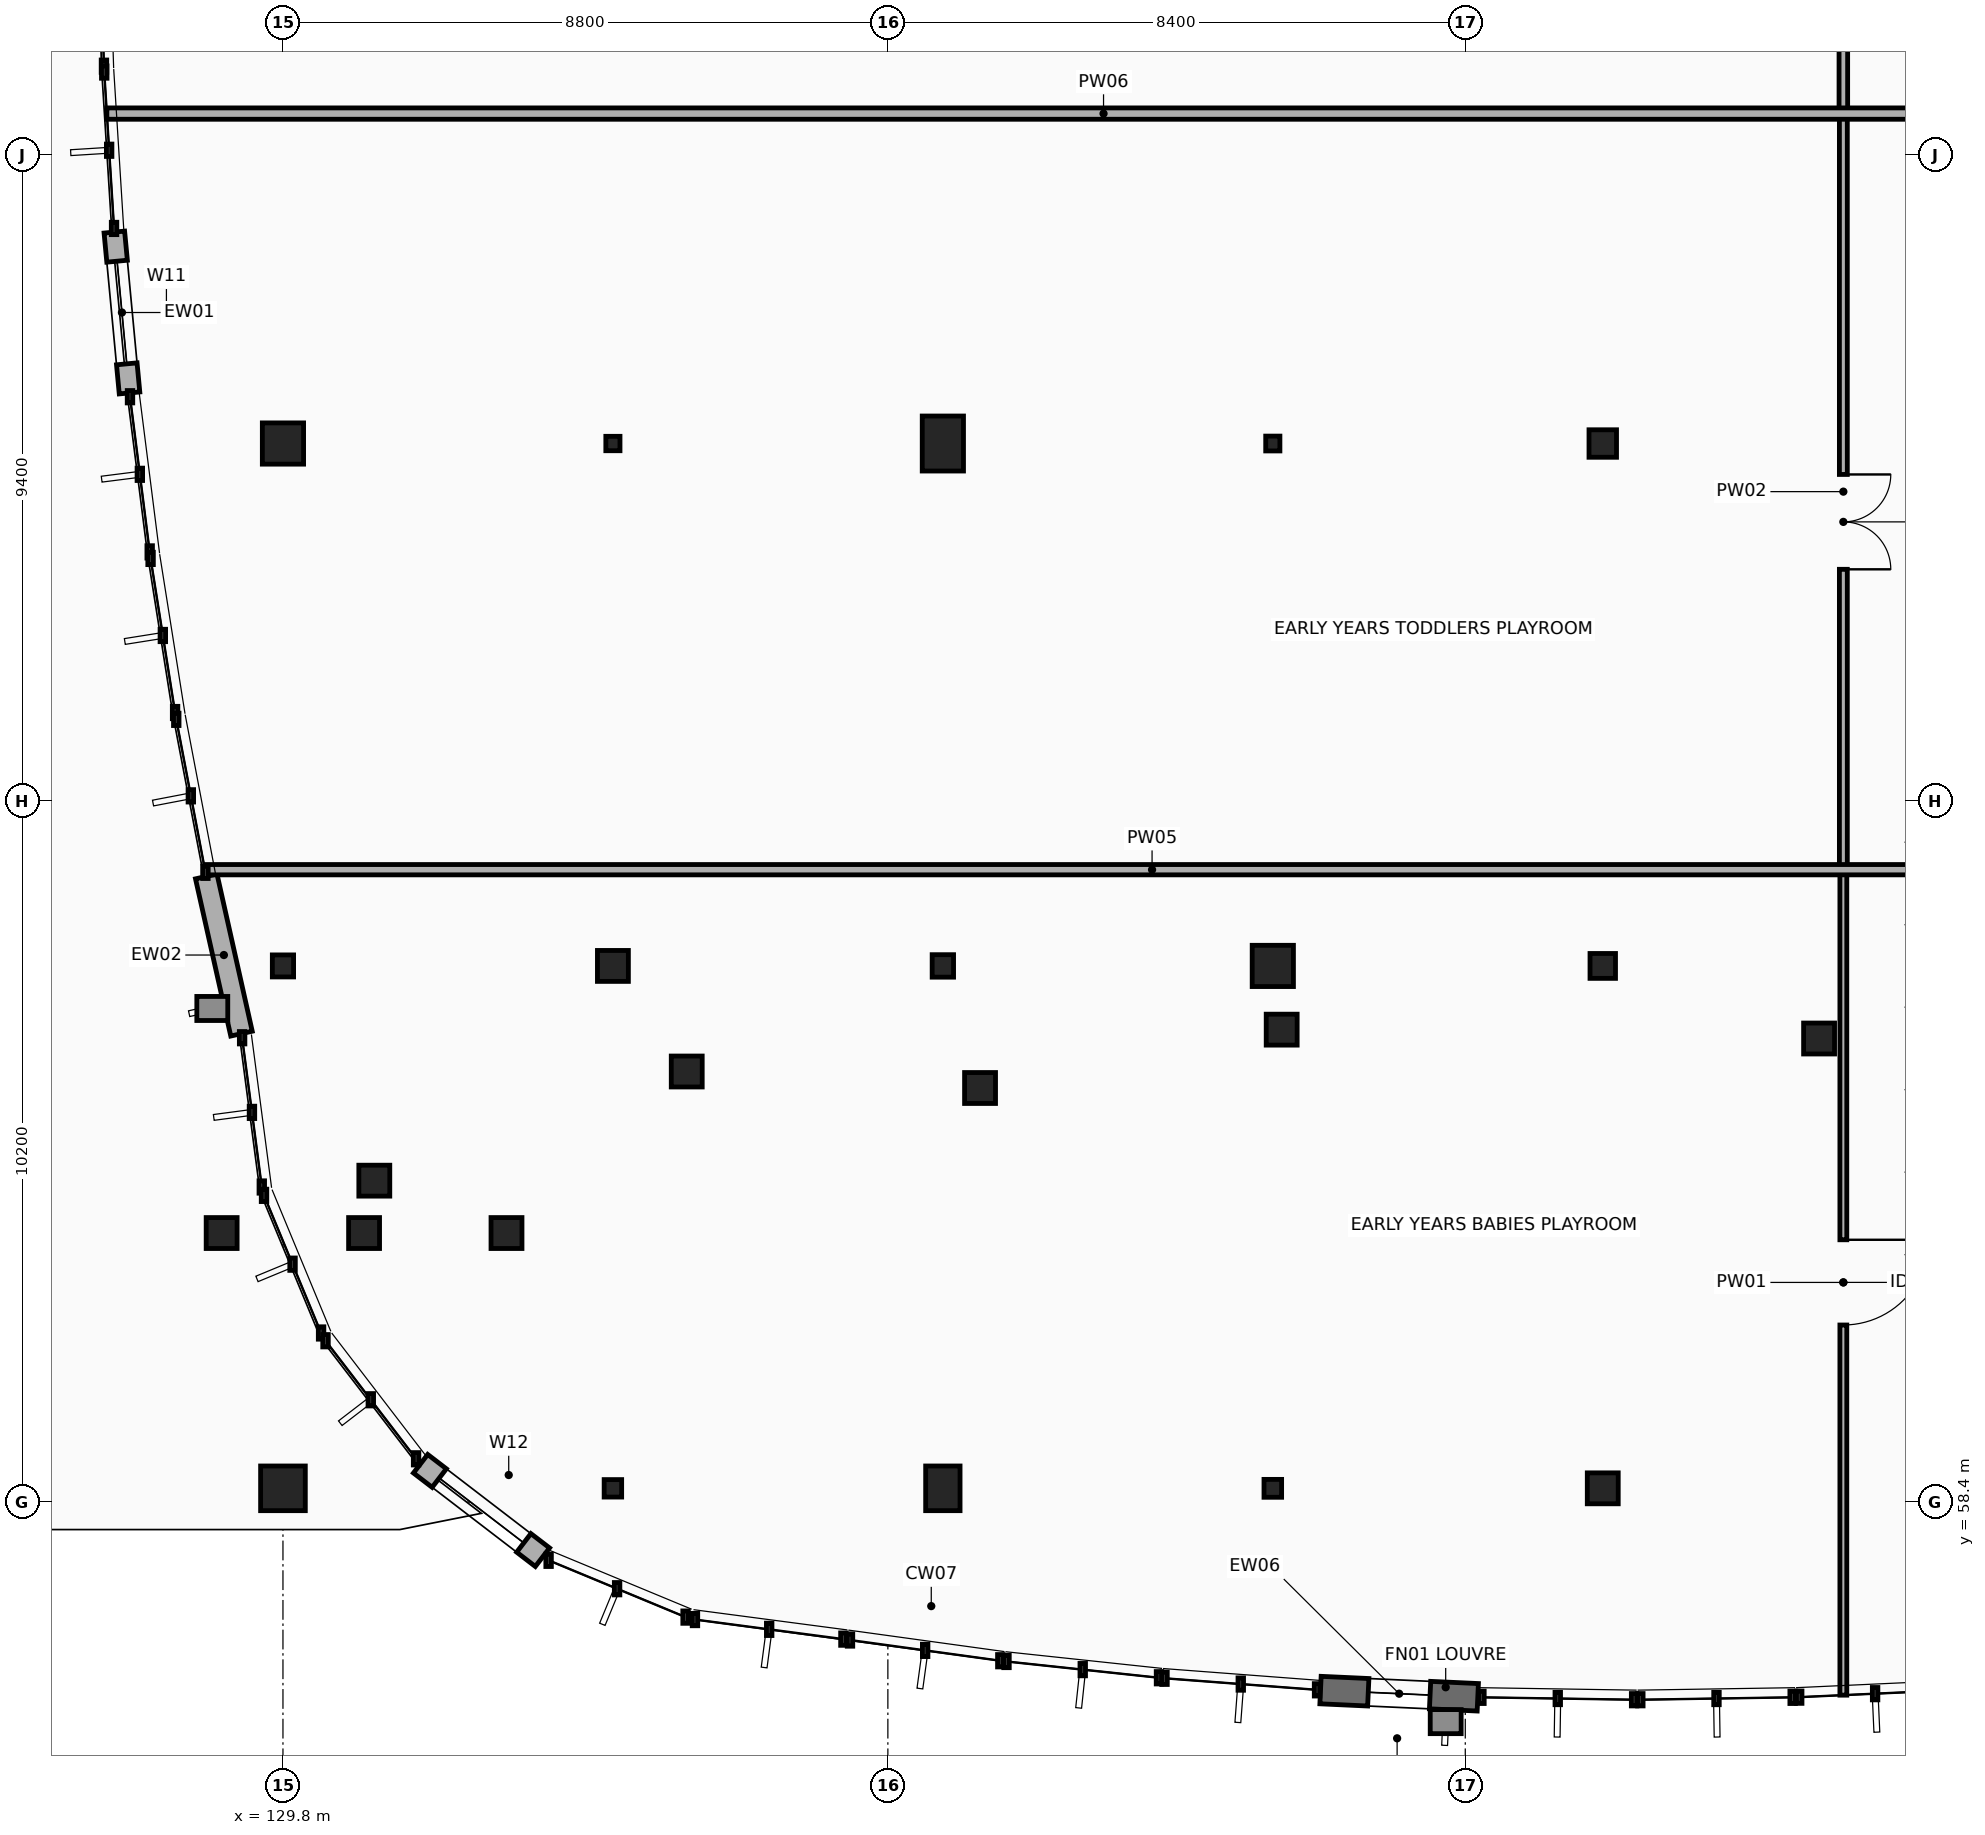
"""IFC4 building model, lengths in metres.
Left out: names, types, materials, properties, quantities, classifications, styles, units other than length and angle.
Written with IfcOpenShell. Run it as: python <this file> out.ifc"""

import sys

from ifc_helpers import new_model, si_unit, direction, frame, frame_2d, origin, origin_2d, place, context, subcontext, project, spatial, rectangle, circle, i_section, extrude, element, fill, save


model = new_model("IFC4")
c1 = context("Model", 3, precision=1e-05, world=origin(), true_north=direction((0.0, 1.0)))
c2 = subcontext(c1, "Body", "Model", "MODEL_VIEW")
j1 = project(units=[si_unit("LENGTHUNIT", "METRE"), si_unit("PLANEANGLEUNIT", "RADIAN")], contexts=[c1])
p1 = place(None, origin())
s1 = spatial("IfcSite", under=j1, at=p1, CompositionType="ELEMENT")
p2 = place(p1, origin())
s2 = spatial("IfcBuilding", under=s1, at=p2, CompositionType="ELEMENT")
p3 = place(p2, origin())
s3 = spatial("IfcBuildingStorey", under=s2, at=p3, CompositionType="ELEMENT", Elevation=0.0)
p4 = place(p3, frame((129.8, 58.6, 0.0), z_axis=(0.0, 0.0, 1.0), x_axis=(1.0, 0.0, 0.0)))
e1 = element("IfcColumn", 1, at=p4, inside=s3, PredefinedType="COLUMN", context=c2, shape_type="SweptSolid", body=[
    extrude(rectangle(XDim=0.65, YDim=0.65, at=origin_2d()), origin(), (0.0, 0.0, 1.0), 4.8),
])
p5 = place(p3, frame((129.8, 66.2, 0.0), z_axis=(0.0, 0.0, 1.0), x_axis=(1.0, 0.0, 0.0)))
e2 = element("IfcColumn", 2, at=p5, inside=s3, PredefinedType="COLUMN", context=c2, shape_type="SweptSolid", body=[
    extrude(i_section(OverallWidth=0.309, OverallDepth=0.321, WebThickness=0.014, FlangeThickness=0.022, at=origin_2d()), origin(), (0.0, 0.0, 1.0), 4.8),
])
p6 = place(p3, frame((129.8, 73.8, 0.0), z_axis=(0.0, 0.0, 1.0), x_axis=(1.0, 0.0, 0.0)))
e3 = element("IfcColumn", 3, at=p6, inside=s3, PredefinedType="COLUMN", context=c2, shape_type="SweptSolid", body=[
    extrude(rectangle(XDim=0.6, YDim=0.6, at=origin_2d()), origin(), (0.0, 0.0, 1.0), 4.8),
])
p7 = place(p3, frame((134.6, 58.6, 0.0), z_axis=(0.0, 0.0, 1.0), x_axis=(1.0, 0.0, 0.0)))
e4 = element("IfcColumn", 4, at=p7, inside=s3, PredefinedType="COLUMN", context=c2, shape_type="SweptSolid", body=[
    extrude(i_section(OverallWidth=0.255, OverallDepth=0.254, WebThickness=0.009, FlangeThickness=0.014, at=origin_2d()), origin(), (0.0, 0.0, 1.0), 4.8),
])
p8 = place(p3, frame((134.6, 66.2, 0.0), z_axis=(0.0, 0.0, 1.0), x_axis=(1.0, 0.0, 0.0)))
e5 = element("IfcColumn", 5, at=p8, inside=s3, PredefinedType="COLUMN", context=c2, shape_type="SweptSolid", body=[
    extrude(rectangle(XDim=0.45, YDim=0.45, at=origin_2d()), origin(), (0.0, 0.0, 1.0), 4.8),
])
p9 = place(p3, frame((134.6, 73.8, 0.0), z_axis=(0.0, 0.0, 1.0), x_axis=(1.0, 0.0, 0.0)))
e6 = element("IfcColumn", 6, at=p9, inside=s3, PredefinedType="COLUMN", context=c2, shape_type="SweptSolid", body=[
    extrude(i_section(OverallWidth=0.206, OverallDepth=0.21, WebThickness=0.01, FlangeThickness=0.014, at=origin_2d()), origin(), (0.0, 0.0, 1.0), 4.8),
])
p10 = place(p3, frame((139.4, 58.6, 0.0), z_axis=(0.0, 0.0, 1.0), x_axis=(1.0, 0.0, 0.0)))
e7 = element("IfcColumn", 7, at=p10, inside=s3, PredefinedType="COLUMN", context=c2, shape_type="SweptSolid", body=[
    extrude(rectangle(XDim=0.5, YDim=0.65, at=origin_2d()), origin(), (0.0, 0.0, 1.0), 4.8),
])
p11 = place(p3, frame((139.4, 66.2, 0.0), z_axis=(0.0, 0.0, 1.0), x_axis=(1.0, 0.0, 0.0)))
e8 = element("IfcColumn", 8, at=p11, inside=s3, PredefinedType="COLUMN", context=c2, shape_type="SweptSolid", body=[
    extrude(i_section(OverallWidth=0.311, OverallDepth=0.327, WebThickness=0.016, FlangeThickness=0.025, at=origin_2d()), origin(), (0.0, 0.0, 1.0), 4.8),
])
p12 = place(p3, frame((139.4, 73.8, 0.0), z_axis=(0.0, 0.0, 1.0), x_axis=(1.0, 0.0, 0.0)))
e9 = element("IfcColumn", 9, at=p12, inside=s3, PredefinedType="COLUMN", context=c2, shape_type="SweptSolid", body=[
    extrude(rectangle(XDim=0.6, YDim=0.8, at=origin_2d()), origin(), (0.0, 0.0, 1.0), 4.8),
])
p13 = place(p3, frame((144.2, 58.6, 0.0), z_axis=(0.0, 0.0, 1.0), x_axis=(1.0, 0.0, 0.0)))
e10 = element("IfcColumn", 10, at=p13, inside=s3, PredefinedType="COLUMN", context=c2, shape_type="SweptSolid", body=[
    extrude(i_section(OverallWidth=0.256, OverallDepth=0.26, WebThickness=0.01, FlangeThickness=0.017, at=origin_2d()), origin(), (0.0, 0.0, 1.0), 4.8),
])
p14 = place(p3, frame((144.2, 66.2, 0.0), z_axis=(0.0, 0.0, 1.0), x_axis=(1.0, 0.0, 0.0)))
e11 = element("IfcColumn", 11, at=p14, inside=s3, PredefinedType="COLUMN", context=c2, shape_type="SweptSolid", body=[
    extrude(rectangle(XDim=0.6, YDim=0.6, at=origin_2d()), origin(), (0.0, 0.0, 1.0), 4.8),
])
p15 = place(p3, frame((144.2, 73.8, 0.0), z_axis=(0.0, 0.0, 1.0), x_axis=(1.0, 0.0, 0.0)))
e12 = element("IfcColumn", 12, at=p15, inside=s3, PredefinedType="COLUMN", context=c2, shape_type="SweptSolid", body=[
    extrude(i_section(OverallWidth=0.206, OverallDepth=0.216, WebThickness=0.01, FlangeThickness=0.017, at=origin_2d()), origin(), (0.0, 0.0, 1.0), 4.8),
])
p16 = place(p3, frame((149.0, 58.6, 0.0), z_axis=(0.0, 0.0, 1.0), x_axis=(1.0, 0.0, 0.0)))
e13 = element("IfcColumn", 13, at=p16, inside=s3, PredefinedType="COLUMN", context=c2, shape_type="SweptSolid", body=[
    extrude(rectangle(XDim=0.45, YDim=0.45, at=origin_2d()), origin(), (0.0, 0.0, 1.0), 4.8),
])
p17 = place(p3, frame((149.0, 66.2, 0.0), z_axis=(0.0, 0.0, 1.0), x_axis=(1.0, 0.0, 0.0)))
e14 = element("IfcColumn", 14, at=p17, inside=s3, PredefinedType="COLUMN", context=c2, shape_type="SweptSolid", body=[
    extrude(i_section(OverallWidth=0.371, OverallDepth=0.362, WebThickness=0.012, FlangeThickness=0.021, at=origin_2d()), origin(), (0.0, 0.0, 1.0), 4.8),
])
p18 = place(p3, frame((149.0, 73.8, 0.0), z_axis=(0.0, 0.0, 1.0), x_axis=(1.0, 0.0, 0.0)))
e15 = element("IfcColumn", 15, at=p18, inside=s3, PredefinedType="COLUMN", context=c2, shape_type="SweptSolid", body=[
    extrude(rectangle(XDim=0.4, YDim=0.4, at=origin_2d()), origin(), (0.0, 0.0, 1.0), 4.8),
])
p19 = place(p3, frame((131.129, 63.076, 0.0), z_axis=(0.0, 0.0, 1.0), x_axis=(1.0, 0.0, 0.0)))
e16 = element("IfcColumn", 16, at=p19, inside=s3, PredefinedType="COLUMN", context=c2, shape_type="SweptSolid", body=[
    extrude(rectangle(XDim=0.45, YDim=0.45, at=origin_2d()), origin(), (0.0, 0.0, 1.0), 4.553),
])
for number, where, z_axis, x_axis in (
    (17, (135.674, 64.664, 0.0), (0.0, 0.0, 1.0), (1.0, 0.0, 0.0)),
    (18, (139.941, 64.424, 0.0), (0.0, 0.0, 1.0), (1.0, 0.0, 0.0)),
    (19, (144.329, 65.273, 0.0), (0.0, 0.0, 1.0), (1.0, 0.0, 0.0)),
    (20, (152.147, 65.144, 0.0), (0.0, 0.0, 1.0), (1.0, 0.0, 0.0)),
):
    element("IfcColumn", number, at=place(p3, frame(where, z_axis=z_axis, x_axis=x_axis)), inside=s3, PredefinedType="COLUMN", context=c2, shape_type="SweptSolid", body=[
        extrude(rectangle(XDim=0.45, YDim=0.45, at=origin_2d()), origin(), (0.0, 0.0, 1.0), 4.8),
    ])
for number, where, z_axis, x_axis in (
    (21, (128.908, 62.314, 0.0), (0.0, 0.0, 1.0), (1.0, 0.0, 0.0)),
    (22, (130.98, 62.314, 0.0), (0.0, 0.0, 1.0), (1.0, 0.0, 0.0)),
    (23, (133.052, 62.314, 0.0), (0.0, 0.0, 1.0), (1.0, 0.0, 0.0)),
):
    element("IfcColumn", number, at=place(p3, frame(where, z_axis=z_axis, x_axis=x_axis)), inside=s3, PredefinedType="COLUMN", context=c2, shape_type="SweptSolid", body=[
        extrude(circle(Radius=0.225, at=origin_2d()), origin(), (0.0, 0.0, 1.0), 4.8),
    ])
p20 = place(p3, frame((147.182, 55.56, 0.0), z_axis=(0.0, 0.0, 1.0), x_axis=(-0.998948885856, 0.045838013117, 0.0)))
e24 = element("IfcWall", 24, at=p20, inside=s3, PredefinedType="STANDARD", context=c2, shape_type="SweptSolid", body=[
    extrude(rectangle(XDim=2.29, YDim=0.4, at=frame_2d((1.145, 0.0))), origin(), (0.0, 0.0, 1.0), 4.537),
])
p21 = place(p20, frame((0.695, 0.0, 0.9)))
e25 = element("IfcOpeningElement", 25, at=p21, cuts=e24, PredefinedType="OPENING", context=c2, shape_type="SweptSolid", body=[
    extrude(rectangle(XDim=0.9, YDim=1.2, at=frame_2d((0.45, 0.6))), frame((0.0, 0.21, 0.0), z_axis=(0.0, -1.0, 0.0), x_axis=(1.0, 0.0, 0.0)), (0.0, 0.0, 1.0), 0.42),
])
p22 = place(p3, frame((127.568, 74.536, 0.0), z_axis=(0.0, 0.0, 1.0), x_axis=(-0.094103241966, 0.995562443974, 0.0)))
e26 = element("IfcWall", 26, at=p22, inside=s3, PredefinedType="STANDARD", context=c2, shape_type="SweptSolid", body=[
    extrude(rectangle(XDim=2.351, YDim=0.3, at=frame_2d((1.175, 0.0))), origin(), (0.0, 0.0, 1.0), 4.537),
])
p23 = place(p22, frame((0.425, 0.0, 0.9)))
e27 = element("IfcOpeningElement", 27, at=p23, cuts=e26, PredefinedType="OPENING", context=c2, shape_type="SweptSolid", body=[
    extrude(rectangle(XDim=1.5, YDim=1.8, at=frame_2d((0.75, 0.9))), frame((0.0, 0.16, 0.0), z_axis=(0.0, -1.0, 0.0), x_axis=(1.0, 0.0, 0.0)), (0.0, 0.0, 1.0), 0.32),
])
p24 = place(p3, frame((129.197, 65.215, 0.0), z_axis=(0.0, 0.0, 1.0), x_axis=(-0.218860234328, 0.975756218443, 0.0)))
e28 = element("IfcWall", 28, at=p24, inside=s3, PredefinedType="STANDARD", context=c2, shape_type="SweptSolid", body=[
    extrude(rectangle(XDim=2.344, YDim=0.32, at=frame_2d((1.172, 0.0))), origin(), (0.0, 0.0, 1.0), 4.537),
])
p25 = place(p3, frame((133.575, 57.598, 0.0), z_axis=(0.0, 0.0, 1.0), x_axis=(-0.793423440591, 0.608670061627, 0.0)))
e29 = element("IfcWall", 29, at=p25, inside=s3, PredefinedType="STANDARD", context=c2, shape_type="SweptSolid", body=[
    extrude(rectangle(XDim=2.235, YDim=0.34, at=frame_2d((1.117, 0.0))), origin(), (0.0, 0.0, 1.0), 4.125),
])
p26 = place(p25, frame((0.342, 0.0, 0.9)))
e30 = element("IfcOpeningElement", 30, at=p26, cuts=e29, PredefinedType="OPENING", context=c2, shape_type="SweptSolid", body=[
    extrude(rectangle(XDim=1.55, YDim=1.65, at=frame_2d((0.775, 0.825))), frame((0.0, 0.18, 0.0), z_axis=(0.0, -1.0, 0.0), x_axis=(1.0, 0.0, 0.0)), (0.0, 0.0, 1.0), 0.36),
])
p27 = place(p3, frame((152.5, 67.6, 0.0), z_axis=(0.0, 0.0, 1.0), x_axis=(0.0, -1.0, 0.0)))
e31 = element("IfcWall", 31, at=p27, inside=s3, PredefinedType="PARTITIONING", context=c2, shape_type="SweptSolid", body=[
    extrude(rectangle(XDim=12.009, YDim=0.1, at=frame_2d((6.004, 0.0))), origin(), (0.0, 0.0, 1.0), 3.835),
])
p28 = place(p27, frame((5.384, 0.0, 0.0)))
e32 = element("IfcOpeningElement", 32, at=p28, cuts=e31, PredefinedType="OPENING", context=c2, shape_type="SweptSolid", body=[
    extrude(rectangle(XDim=1.24, YDim=2.16, at=frame_2d((0.62, 1.08))), frame((0.0, 0.06, 0.0), z_axis=(0.0, -1.0, 0.0), x_axis=(1.0, 0.0, 0.0)), (0.0, 0.0, 1.0), 0.12),
])
p29 = place(p3, frame((152.5, 78.6, 0.0), z_axis=(0.0, 0.0, 1.0), x_axis=(0.0, -1.0, 0.0)))
e33 = element("IfcWall", 33, at=p29, inside=s3, PredefinedType="PARTITIONING", context=c2, shape_type="SweptSolid", body=[
    extrude(rectangle(XDim=11.0, YDim=0.115, at=frame_2d((5.5, 0.0))), origin(), (0.0, 0.0, 1.0), 3.615),
])
p30 = place(p29, frame((5.25, 0.0, 0.0)))
e34 = element("IfcOpeningElement", 34, at=p30, cuts=e33, PredefinedType="OPENING", context=c2, shape_type="SweptSolid", body=[
    extrude(rectangle(XDim=1.38, YDim=2.2, at=frame_2d((0.69, 1.1))), frame((0.0, 0.067, 0.0), z_axis=(0.0, -1.0, 0.0), x_axis=(1.0, 0.0, 0.0)), (0.0, 0.0, 1.0), 0.135),
])
p31 = place(p3, frame((152.5, 89.6, 0.0), z_axis=(0.0, 0.0, 1.0), x_axis=(0.0, -1.0, 0.0)))
e35 = element("IfcWall", 35, at=p31, inside=s3, PredefinedType="PARTITIONING", context=c2, shape_type="SweptSolid", body=[
    extrude(rectangle(XDim=11.0, YDim=0.125, at=frame_2d((5.5, 0.0))), origin(), (0.0, 0.0, 1.0), 3.565),
])
p32 = place(p31, frame((4.99, 0.0, 0.0)))
e36 = element("IfcOpeningElement", 36, at=p32, cuts=e35, PredefinedType="OPENING", context=c2, shape_type="SweptSolid", body=[
    extrude(rectangle(XDim=1.02, YDim=2.14, at=frame_2d((0.51, 1.07))), frame((0.0, 0.073, 0.0), z_axis=(0.0, -1.0, 0.0), x_axis=(1.0, 0.0, 0.0)), (0.0, 0.0, 1.0), 0.145),
])
p33 = place(p3, frame((128.665, 67.6, 0.0), z_axis=(0.0, 0.0, 1.0), x_axis=(1.0, 0.0, 0.0)))
e37 = element("IfcWall", 37, at=p33, inside=s3, PredefinedType="PARTITIONING", context=c2, shape_type="SweptSolid", body=[
    extrude(rectangle(XDim=27.557, YDim=0.15, at=frame_2d((13.778, 0.0))), origin(), (0.0, 0.0, 1.0), 3.805),
])
p34 = place(p3, frame((127.238, 78.6, 0.0), z_axis=(0.0, 0.0, 1.0), x_axis=(1.0, 0.0, 0.0)))
e38 = element("IfcWall", 38, at=p34, inside=s3, PredefinedType="PARTITIONING", context=c2, shape_type="SweptSolid", body=[
    extrude(rectangle(XDim=28.999, YDim=0.165, at=frame_2d((14.5, 0.0))), origin(), (0.0, 0.0, 1.0), 3.903),
])
p35 = place(p21, origin())
e39 = element("IfcWindow", 39, at=p35, inside=s3, PartitioningType="SINGLE_PANEL", PredefinedType="WINDOW", context=c2, shape_type="SweptSolid", body=[
    extrude(rectangle(XDim=0.9, YDim=1.2, at=frame_2d((0.45, 0.6))), frame((0.0, 0.03, 0.0), z_axis=(0.0, -1.0, 0.0), x_axis=(1.0, 0.0, 0.0)), (0.0, 0.0, 1.0), 0.06),
])
fill(e25, e39)
p36 = place(p23, origin())
e40 = element("IfcWindow", 40, at=p36, inside=s3, PartitioningType="SINGLE_PANEL", PredefinedType="WINDOW", context=c2, shape_type="SweptSolid", body=[
    extrude(rectangle(XDim=1.5, YDim=1.8, at=frame_2d((0.75, 0.9))), frame((0.0, 0.03, 0.0), z_axis=(0.0, -1.0, 0.0), x_axis=(1.0, 0.0, 0.0)), (0.0, 0.0, 1.0), 0.06),
])
fill(e27, e40)
p37 = place(p26, origin())
e41 = element("IfcWindow", 41, at=p37, inside=s3, PartitioningType="SINGLE_PANEL", PredefinedType="WINDOW", context=c2, shape_type="SweptSolid", body=[
    extrude(rectangle(XDim=1.55, YDim=1.65, at=frame_2d((0.775, 0.825))), frame((0.0, 0.03, 0.0), z_axis=(0.0, -1.0, 0.0), x_axis=(1.0, 0.0, 0.0)), (0.0, 0.0, 1.0), 0.06),
])
fill(e30, e41)
p38 = place(p28, origin())
e42 = element("IfcDoor", 42, at=p38, inside=s3, OperationType="SINGLE_SWING_LEFT", PredefinedType="DOOR", context=c2, shape_type="SweptSolid", body=[
    extrude(rectangle(XDim=1.24, YDim=2.16, at=frame_2d((0.62, 1.08))), frame((0.0, 0.025, 0.0), z_axis=(0.0, -1.0, 0.0), x_axis=(1.0, 0.0, 0.0)), (0.0, 0.0, 1.0), 0.05),
])
fill(e32, e42)
p39 = place(p30, origin())
e43 = element("IfcDoor", 43, at=p39, inside=s3, OperationType="DOUBLE_DOOR_SINGLE_SWING", PredefinedType="DOOR", context=c2, shape_type="SweptSolid", body=[
    extrude(rectangle(XDim=1.38, YDim=2.2, at=frame_2d((0.69, 1.1))), frame((0.0, 0.025, 0.0), z_axis=(0.0, -1.0, 0.0), x_axis=(1.0, 0.0, 0.0)), (0.0, 0.0, 1.0), 0.05),
])
fill(e34, e43)
save(model, sys.argv[1])
